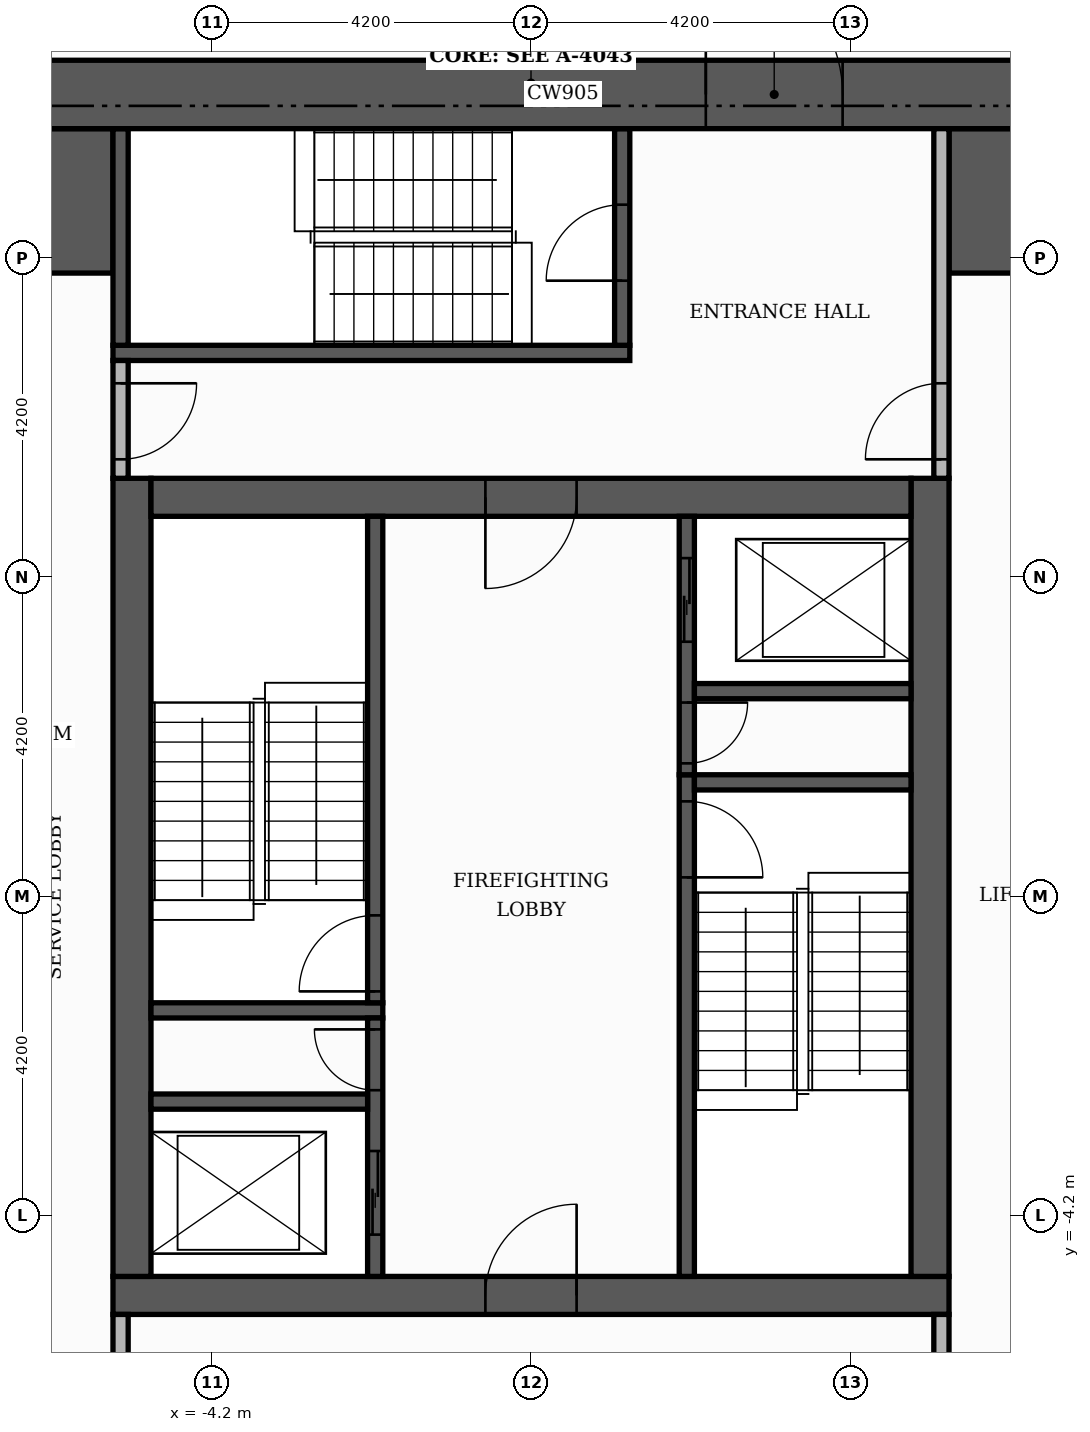
"""IFC4 building model, lengths in metres.
Left out: names, types, materials, properties, quantities, classifications, styles, units other than length and angle.
Written with IfcOpenShell. Run it as: python <this file> out.ifc"""

import sys

from ifc_helpers import new_model, si_unit, direction, frame, frame_2d, origin, place, context, subcontext, project, spatial, rectangle, extrude, element, fill, save


model = new_model("IFC4")
c1 = context("Model", 3, precision=1e-05, world=origin(), true_north=direction((0.0, 1.0)))
c2 = subcontext(c1, "Body", "Model", "MODEL_VIEW")
j1 = project(units=[si_unit("LENGTHUNIT", "METRE"), si_unit("PLANEANGLEUNIT", "RADIAN")], contexts=[c1])
p1 = place(None, origin())
s1 = spatial("IfcSite", under=j1, at=p1, CompositionType="ELEMENT")
p2 = place(p1, origin())
s2 = spatial("IfcBuilding", under=s1, at=p2, CompositionType="ELEMENT")
p3 = place(p2, frame((0.0, 0.0, 267.9)))
s3 = spatial("IfcBuildingStorey", under=s2, at=p3, CompositionType="ELEMENT", Elevation=267.9)
p4 = place(p3, frame((-5.5, -5.25, 0.0), z_axis=(0.0, 0.0, 1.0), x_axis=(1.0, 0.0, 0.0)))
e1 = element("IfcWall", 1, at=p4, inside=s3, PredefinedType="SHEAR", context=c2, shape_type="SweptSolid", body=[
    extrude(rectangle(XDim=11.0, YDim=0.5, at=frame_2d((5.5, 0.0))), origin(), (0.0, 0.0, 1.0), 3.48),
])
p5 = place(p4, frame((4.9, 0.0, 0.0)))
e2 = element("IfcOpeningElement", 2, at=p5, cuts=e1, PredefinedType="OPENING", context=c2, shape_type="SweptSolid", body=[
    extrude(rectangle(XDim=1.2, YDim=2.1, at=frame_2d((0.6, 1.05))), frame((0.0, 0.26, 0.0), z_axis=(0.0, -1.0, 0.0), x_axis=(1.0, 0.0, 0.0)), (0.0, 0.0, 1.0), 0.52),
])
for number, where, z_axis, x_axis in (
    (3, (-5.25, -5.0, 0.0), (0.0, 0.0, 1.0), (0.0, 1.0, 0.0)),
    (4, (5.25, -5.0, 0.0), (0.0, 0.0, 1.0), (0.0, 1.0, 0.0)),
):
    element("IfcWall", number, at=place(p3, frame(where, z_axis=z_axis, x_axis=x_axis)), inside=s3, PredefinedType="SHEAR", context=c2, shape_type="SweptSolid", body=[
        extrude(rectangle(XDim=10.5, YDim=0.5, at=frame_2d((5.25, 0.0))), origin(), (0.0, 0.0, 1.0), 3.48),
    ])
p6 = place(p3, frame((-5.0, 5.25, 0.0), z_axis=(0.0, 0.0, 1.0), x_axis=(1.0, 0.0, 0.0)))
e5 = element("IfcWall", 5, at=p6, inside=s3, PredefinedType="SHEAR", context=c2, shape_type="SweptSolid", body=[
    extrude(rectangle(XDim=10.0, YDim=0.5, at=frame_2d((5.0, 0.0))), origin(), (0.0, 0.0, 1.0), 3.48),
])
p7 = place(p6, frame((4.4, 0.0, 0.0)))
e6 = element("IfcOpeningElement", 6, at=p7, cuts=e5, PredefinedType="OPENING", context=c2, shape_type="SweptSolid", body=[
    extrude(rectangle(XDim=1.2, YDim=2.1, at=frame_2d((0.6, 1.05))), frame((0.0, 0.26, 0.0), z_axis=(0.0, -1.0, 0.0), x_axis=(1.0, 0.0, 0.0)), (0.0, 0.0, 1.0), 0.52),
])
for number, where, z_axis, x_axis in (
    (7, (-10.1, 9.15, 0.0), (0.0, 0.0, 1.0), (1.0, 0.0, 0.0)),
    (8, (5.5, 9.15, 0.0), (0.0, 0.0, 1.0), (1.0, 0.0, 0.0)),
):
    element("IfcWall", number, at=place(p3, frame(where, z_axis=z_axis, x_axis=x_axis)), inside=s3, PredefinedType="SHEAR", context=c2, shape_type="SweptSolid", body=[
        extrude(rectangle(XDim=4.6, YDim=1.9, at=frame_2d((2.3, 0.0))), origin(), (0.0, 0.0, 1.0), 3.48),
    ])
p8 = place(p3, frame((2.05, -5.0, 0.0), z_axis=(0.0, 0.0, 1.0), x_axis=(0.0, 1.0, 0.0)))
e9 = element("IfcWall", 9, at=p8, inside=s3, PredefinedType="SHEAR", context=c2, shape_type="SweptSolid", body=[
    extrude(rectangle(XDim=6.6, YDim=0.2, at=frame_2d((3.3, 0.0))), origin(), (0.0, 0.0, 1.0), 3.48),
])
p9 = place(p8, frame((5.25, 0.0, 0.0)))
e10 = element("IfcOpeningElement", 10, at=p9, cuts=e9, PredefinedType="OPENING", context=c2, shape_type="SweptSolid", body=[
    extrude(rectangle(XDim=1.0, YDim=2.1, at=frame_2d((0.5, 1.05))), frame((0.0, 0.11, 0.0), z_axis=(0.0, -1.0, 0.0), x_axis=(1.0, 0.0, 0.0)), (0.0, 0.0, 1.0), 0.22),
])
p10 = place(p3, frame((-5.0, -1.5, 0.0), z_axis=(0.0, 0.0, 1.0), x_axis=(1.0, 0.0, 0.0)))
e11 = element("IfcWall", 11, at=p10, inside=s3, PredefinedType="SHEAR", context=c2, shape_type="SweptSolid", body=[
    extrude(rectangle(XDim=3.05, YDim=0.2, at=frame_2d((1.525, 0.0))), origin(), (0.0, 0.0, 1.0), 3.48),
])
p11 = place(p3, frame((-2.05, -1.4, 0.0), z_axis=(0.0, 0.0, 1.0), x_axis=(0.0, 1.0, 0.0)))
e12 = element("IfcWall", 12, at=p11, inside=s3, PredefinedType="SHEAR", context=c2, shape_type="SweptSolid", body=[
    extrude(rectangle(XDim=6.4, YDim=0.2, at=frame_2d((3.2, 0.0))), origin(), (0.0, 0.0, 1.0), 3.48),
])
p12 = place(p11, frame((0.15, 0.0, 0.0)))
e13 = element("IfcOpeningElement", 13, at=p12, cuts=e12, PredefinedType="OPENING", context=c2, shape_type="SweptSolid", body=[
    extrude(rectangle(XDim=1.0, YDim=2.1, at=frame_2d((0.5, 1.05))), frame((0.0, 0.11, 0.0), z_axis=(0.0, -1.0, 0.0), x_axis=(1.0, 0.0, 0.0)), (0.0, 0.0, 1.0), 0.22),
])
p13 = place(p3, frame((2.15, 1.5, 0.0), z_axis=(0.0, 0.0, 1.0), x_axis=(1.0, 0.0, 0.0)))
e14 = element("IfcWall", 14, at=p13, inside=s3, PredefinedType="SHEAR", context=c2, shape_type="SweptSolid", body=[
    extrude(rectangle(XDim=2.85, YDim=0.2, at=frame_2d((1.425, 0.0))), origin(), (0.0, 0.0, 1.0), 3.48),
])
p14 = place(p3, frame((-5.5, 7.15, 0.0), z_axis=(0.0, 0.0, 1.0), x_axis=(1.0, 0.0, 0.0)))
e15 = element("IfcWall", 15, at=p14, inside=s3, PredefinedType="SHEAR", context=c2, shape_type="SweptSolid", body=[
    extrude(rectangle(XDim=6.8, YDim=0.2, at=frame_2d((3.4, 0.0))), origin(), (0.0, 0.0, 1.0), 3.48),
])
p15 = place(p3, frame((-5.4, 7.25, 0.0), z_axis=(0.0, 0.0, 1.0), x_axis=(0.0, 1.0, 0.0)))
e16 = element("IfcWall", 16, at=p15, inside=s3, PredefinedType="SHEAR", context=c2, shape_type="SweptSolid", body=[
    extrude(rectangle(XDim=2.85, YDim=0.2, at=frame_2d((1.425, 0.0))), origin(), (0.0, 0.0, 1.0), 3.48),
])
p16 = place(p3, frame((1.2, 7.25, 0.0), z_axis=(0.0, 0.0, 1.0), x_axis=(0.0, 1.0, 0.0)))
e17 = element("IfcWall", 17, at=p16, inside=s3, PredefinedType="SHEAR", context=c2, shape_type="SweptSolid", body=[
    extrude(rectangle(XDim=2.85, YDim=0.2, at=frame_2d((1.425, 0.0))), origin(), (0.0, 0.0, 1.0), 3.48),
])
p17 = place(p16, frame((0.85, 0.0, 0.0)))
e18 = element("IfcOpeningElement", 18, at=p17, cuts=e17, PredefinedType="OPENING", context=c2, shape_type="SweptSolid", body=[
    extrude(rectangle(XDim=1.0, YDim=2.1, at=frame_2d((0.5, 1.05))), frame((0.0, 0.11, 0.0), z_axis=(0.0, -1.0, 0.0), x_axis=(1.0, 0.0, 0.0)), (0.0, 0.0, 1.0), 0.22),
])
p18 = place(p3, frame((-2.05, -5.0, 0.0), z_axis=(0.0, 0.0, 1.0), x_axis=(0.0, 1.0, 0.0)))
e19 = element("IfcWall", 19, at=p18, inside=s3, PredefinedType="SHEAR", context=c2, shape_type="SweptSolid", body=[
    extrude(rectangle(XDim=3.4, YDim=0.2, at=frame_2d((1.7, 0.0))), origin(), (0.0, 0.0, 1.0), 3.48),
])
p19 = place(p18, frame((0.55, 0.0, 0.0)))
e20 = element("IfcOpeningElement", 20, at=p19, cuts=e19, PredefinedType="OPENING", context=c2, shape_type="SweptSolid", body=[
    extrude(rectangle(XDim=1.1, YDim=2.1, at=frame_2d((0.55, 1.05))), frame((0.0, 0.11, 0.0), z_axis=(0.0, -1.0, 0.0), x_axis=(1.0, 0.0, 0.0)), (0.0, 0.0, 1.0), 0.22),
])
p20 = place(p18, frame((2.45, 0.0, 0.0)))
e21 = element("IfcOpeningElement", 21, at=p20, cuts=e19, PredefinedType="OPENING", context=c2, shape_type="SweptSolid", body=[
    extrude(rectangle(XDim=0.8, YDim=2.1, at=frame_2d((0.4, 1.05))), frame((0.0, 0.11, 0.0), z_axis=(0.0, -1.0, 0.0), x_axis=(1.0, 0.0, 0.0)), (0.0, 0.0, 1.0), 0.22),
])
p21 = place(p3, frame((-5.0, -2.7, 0.0), z_axis=(0.0, 0.0, 1.0), x_axis=(1.0, 0.0, 0.0)))
e22 = element("IfcWall", 22, at=p21, inside=s3, PredefinedType="SHEAR", context=c2, shape_type="SweptSolid", body=[
    extrude(rectangle(XDim=2.85, YDim=0.2, at=frame_2d((1.425, 0.0))), origin(), (0.0, 0.0, 1.0), 3.48),
])
p22 = place(p3, frame((2.05, 1.6, 0.0), z_axis=(0.0, 0.0, 1.0), x_axis=(0.0, 1.0, 0.0)))
e23 = element("IfcWall", 23, at=p22, inside=s3, PredefinedType="SHEAR", context=c2, shape_type="SweptSolid", body=[
    extrude(rectangle(XDim=3.4, YDim=0.2, at=frame_2d((1.7, 0.0))), origin(), (0.0, 0.0, 1.0), 3.48),
])
p23 = place(p22, frame((1.75, 0.0, 0.0)))
e24 = element("IfcOpeningElement", 24, at=p23, cuts=e23, PredefinedType="OPENING", context=c2, shape_type="SweptSolid", body=[
    extrude(rectangle(XDim=1.1, YDim=2.1, at=frame_2d((0.55, 1.05))), frame((0.0, 0.11, 0.0), z_axis=(0.0, -1.0, 0.0), x_axis=(1.0, 0.0, 0.0)), (0.0, 0.0, 1.0), 0.22),
])
p24 = place(p22, frame((0.15, 0.0, 0.0)))
e25 = element("IfcOpeningElement", 25, at=p24, cuts=e23, PredefinedType="OPENING", context=c2, shape_type="SweptSolid", body=[
    extrude(rectangle(XDim=0.8, YDim=2.1, at=frame_2d((0.4, 1.05))), frame((0.0, 0.11, 0.0), z_axis=(0.0, -1.0, 0.0), x_axis=(1.0, 0.0, 0.0)), (0.0, 0.0, 1.0), 0.22),
])
p25 = place(p3, frame((2.15, 2.7, 0.0), z_axis=(0.0, 0.0, 1.0), x_axis=(1.0, 0.0, 0.0)))
e26 = element("IfcWall", 26, at=p25, inside=s3, PredefinedType="SHEAR", context=c2, shape_type="SweptSolid", body=[
    extrude(rectangle(XDim=2.85, YDim=0.2, at=frame_2d((1.425, 0.0))), origin(), (0.0, 0.0, 1.0), 3.48),
])
p26 = place(p3, frame((-11.0, 10.55, 0.0), z_axis=(0.0, 0.0, 1.0), x_axis=(1.0, 0.0, 0.0)))
e27 = element("IfcWall", 27, at=p26, inside=s3, PredefinedType="SHEAR", context=c2, shape_type="SweptSolid", body=[
    extrude(rectangle(XDim=22.0, YDim=0.9, at=frame_2d((11.0, 0.0))), origin(), (0.0, 0.0, 1.0), 3.48),
])
p27 = place(p26, frame((13.3, 0.0, 0.0)))
e28 = element("IfcOpeningElement", 28, at=p27, cuts=e27, PredefinedType="OPENING", context=c2, shape_type="SweptSolid", body=[
    extrude(rectangle(XDim=1.8, YDim=2.2, at=frame_2d((0.9, 1.1))), frame((0.0, 0.46, 0.0), z_axis=(0.0, -1.0, 0.0), x_axis=(1.0, 0.0, 0.0)), (0.0, 0.0, 1.0), 0.92),
])
p28 = place(p3, frame((-5.4, -10.1, 0.0), z_axis=(0.0, 0.0, 1.0), x_axis=(0.0, 1.0, 0.0)))
e29 = element("IfcWall", 29, at=p28, inside=s3, PredefinedType="PARTITIONING", context=c2, shape_type="SweptSolid", body=[
    extrude(rectangle(XDim=4.6, YDim=0.2, at=frame_2d((2.3, 0.0))), origin(), (0.0, 0.0, 1.0), 3.48),
])
p29 = place(p28, frame((2.9, 0.0, 0.0)))
e30 = element("IfcOpeningElement", 30, at=p29, cuts=e29, PredefinedType="OPENING", context=c2, shape_type="SweptSolid", body=[
    extrude(rectangle(XDim=1.0, YDim=2.1, at=frame_2d((0.5, 1.05))), frame((0.0, 0.11, 0.0), z_axis=(0.0, -1.0, 0.0), x_axis=(1.0, 0.0, 0.0)), (0.0, 0.0, 1.0), 0.22),
])
p30 = place(p3, frame((5.4, -10.1, 0.0), z_axis=(0.0, 0.0, 1.0), x_axis=(0.0, 1.0, 0.0)))
e31 = element("IfcWall", 31, at=p30, inside=s3, PredefinedType="PARTITIONING", context=c2, shape_type="SweptSolid", body=[
    extrude(rectangle(XDim=4.6, YDim=0.2, at=frame_2d((2.3, 0.0))), origin(), (0.0, 0.0, 1.0), 3.48),
])
p31 = place(p30, frame((2.9, 0.0, 0.0)))
e32 = element("IfcOpeningElement", 32, at=p31, cuts=e31, PredefinedType="OPENING", context=c2, shape_type="SweptSolid", body=[
    extrude(rectangle(XDim=1.0, YDim=2.1, at=frame_2d((0.5, 1.05))), frame((0.0, 0.11, 0.0), z_axis=(0.0, -1.0, 0.0), x_axis=(1.0, 0.0, 0.0)), (0.0, 0.0, 1.0), 0.22),
])
p32 = place(p3, frame((-5.4, 5.5, 0.0), z_axis=(0.0, 0.0, 1.0), x_axis=(0.0, 1.0, 0.0)))
e33 = element("IfcWall", 33, at=p32, inside=s3, PredefinedType="PARTITIONING", context=c2, shape_type="SweptSolid", body=[
    extrude(rectangle(XDim=1.55, YDim=0.2, at=frame_2d((0.775, 0.0))), origin(), (0.0, 0.0, 1.0), 3.48),
])
p33 = place(p32, frame((0.25, 0.0, 0.0)))
e34 = element("IfcOpeningElement", 34, at=p33, cuts=e33, PredefinedType="OPENING", context=c2, shape_type="SweptSolid", body=[
    extrude(rectangle(XDim=1.0, YDim=2.1, at=frame_2d((0.5, 1.05))), frame((0.0, 0.11, 0.0), z_axis=(0.0, -1.0, 0.0), x_axis=(1.0, 0.0, 0.0)), (0.0, 0.0, 1.0), 0.22),
])
p34 = place(p3, frame((5.4, 5.5, 0.0), z_axis=(0.0, 0.0, 1.0), x_axis=(0.0, 1.0, 0.0)))
e35 = element("IfcWall", 35, at=p34, inside=s3, PredefinedType="PARTITIONING", context=c2, shape_type="SweptSolid", body=[
    extrude(rectangle(XDim=4.6, YDim=0.2, at=frame_2d((2.3, 0.0))), origin(), (0.0, 0.0, 1.0), 3.48),
])
p35 = place(p34, frame((0.25, 0.0, 0.0)))
e36 = element("IfcOpeningElement", 36, at=p35, cuts=e35, PredefinedType="OPENING", context=c2, shape_type="SweptSolid", body=[
    extrude(rectangle(XDim=1.0, YDim=2.1, at=frame_2d((0.5, 1.05))), frame((0.0, 0.11, 0.0), z_axis=(0.0, -1.0, 0.0), x_axis=(1.0, 0.0, 0.0)), (0.0, 0.0, 1.0), 0.22),
])
p36 = place(p23, origin())
e37 = element("IfcDoor", 37, at=p36, inside=s3, OperationType="SLIDING_TO_LEFT", PredefinedType="DOOR", context=c2, shape_type="SweptSolid", body=[
    extrude(rectangle(XDim=1.1, YDim=2.1, at=frame_2d((0.55, 1.05))), frame((0.0, 0.025, 0.0), z_axis=(0.0, -1.0, 0.0), x_axis=(1.0, 0.0, 0.0)), (0.0, 0.0, 1.0), 0.05),
])
fill(e24, e37)
p37 = place(p19, origin())
e38 = element("IfcDoor", 38, at=p37, inside=s3, OperationType="SLIDING_TO_LEFT", PredefinedType="DOOR", context=c2, shape_type="SweptSolid", body=[
    extrude(rectangle(XDim=1.1, YDim=2.1, at=frame_2d((0.55, 1.05))), frame((0.0, 0.025, 0.0), z_axis=(0.0, -1.0, 0.0), x_axis=(1.0, 0.0, 0.0)), (0.0, 0.0, 1.0), 0.05),
])
fill(e20, e38)
p38 = place(p12, origin())
e39 = element("IfcDoor", 39, at=p38, inside=s3, OperationType="SINGLE_SWING_LEFT", PredefinedType="DOOR", context=c2, shape_type="SweptSolid", body=[
    extrude(rectangle(XDim=1.0, YDim=2.1, at=frame_2d((0.5, 1.05))), frame((0.0, 0.025, 0.0), z_axis=(0.0, -1.0, 0.0), x_axis=(1.0, 0.0, 0.0)), (0.0, 0.0, 1.0), 0.05),
])
fill(e13, e39)
p39 = place(p9, frame((1.0, 0.0, 0.0), z_axis=(0.0, 0.0, 1.0), x_axis=(-1.0, 0.0, 0.0)))
e40 = element("IfcDoor", 40, at=p39, inside=s3, OperationType="SINGLE_SWING_LEFT", PredefinedType="DOOR", context=c2, shape_type="SweptSolid", body=[
    extrude(rectangle(XDim=1.0, YDim=2.1, at=frame_2d((0.5, 1.05))), frame((0.0, 0.025, 0.0), z_axis=(0.0, -1.0, 0.0), x_axis=(1.0, 0.0, 0.0)), (0.0, 0.0, 1.0), 0.05),
])
fill(e10, e40)
p40 = place(p24, frame((0.8, 0.0, 0.0), z_axis=(0.0, 0.0, 1.0), x_axis=(-1.0, 0.0, 0.0)))
e41 = element("IfcDoor", 41, at=p40, inside=s3, OperationType="SINGLE_SWING_RIGHT", PredefinedType="DOOR", context=c2, shape_type="SweptSolid", body=[
    extrude(rectangle(XDim=0.8, YDim=2.1, at=frame_2d((0.4, 1.05))), frame((0.0, 0.025, 0.0), z_axis=(0.0, -1.0, 0.0), x_axis=(1.0, 0.0, 0.0)), (0.0, 0.0, 1.0), 0.05),
])
fill(e25, e41)
p41 = place(p20, origin())
e42 = element("IfcDoor", 42, at=p41, inside=s3, OperationType="SINGLE_SWING_RIGHT", PredefinedType="DOOR", context=c2, shape_type="SweptSolid", body=[
    extrude(rectangle(XDim=0.8, YDim=2.1, at=frame_2d((0.4, 1.05))), frame((0.0, 0.025, 0.0), z_axis=(0.0, -1.0, 0.0), x_axis=(1.0, 0.0, 0.0)), (0.0, 0.0, 1.0), 0.05),
])
fill(e21, e42)
p42 = place(p7, frame((1.2, 0.0, 0.0), z_axis=(0.0, 0.0, 1.0), x_axis=(-1.0, 0.0, 0.0)))
e43 = element("IfcDoor", 43, at=p42, inside=s3, OperationType="SINGLE_SWING_LEFT", PredefinedType="DOOR", context=c2, shape_type="SweptSolid", body=[
    extrude(rectangle(XDim=1.2, YDim=2.1, at=frame_2d((0.6, 1.05))), frame((0.0, 0.025, 0.0), z_axis=(0.0, -1.0, 0.0), x_axis=(1.0, 0.0, 0.0)), (0.0, 0.0, 1.0), 0.05),
])
fill(e6, e43)
p43 = place(p5, origin())
e44 = element("IfcDoor", 44, at=p43, inside=s3, OperationType="SINGLE_SWING_RIGHT", PredefinedType="DOOR", context=c2, shape_type="SweptSolid", body=[
    extrude(rectangle(XDim=1.2, YDim=2.1, at=frame_2d((0.6, 1.05))), frame((0.0, 0.025, 0.0), z_axis=(0.0, -1.0, 0.0), x_axis=(1.0, 0.0, 0.0)), (0.0, 0.0, 1.0), 0.05),
])
fill(e2, e44)
p44 = place(p17, origin())
e45 = element("IfcDoor", 45, at=p44, inside=s3, OperationType="SINGLE_SWING_LEFT", PredefinedType="DOOR", context=c2, shape_type="SweptSolid", body=[
    extrude(rectangle(XDim=1.0, YDim=2.1, at=frame_2d((0.5, 1.05))), frame((0.0, 0.025, 0.0), z_axis=(0.0, -1.0, 0.0), x_axis=(1.0, 0.0, 0.0)), (0.0, 0.0, 1.0), 0.05),
])
fill(e18, e45)
p45 = place(p33, frame((1.0, 0.0, 0.0), z_axis=(0.0, 0.0, 1.0), x_axis=(-1.0, 0.0, 0.0)))
e46 = element("IfcDoor", 46, at=p45, inside=s3, OperationType="SINGLE_SWING_RIGHT", PredefinedType="DOOR", context=c2, shape_type="SweptSolid", body=[
    extrude(rectangle(XDim=1.0, YDim=2.1, at=frame_2d((0.5, 1.05))), frame((0.0, 0.025, 0.0), z_axis=(0.0, -1.0, 0.0), x_axis=(1.0, 0.0, 0.0)), (0.0, 0.0, 1.0), 0.05),
])
fill(e34, e46)
p46 = place(p35, origin())
e47 = element("IfcDoor", 47, at=p46, inside=s3, OperationType="SINGLE_SWING_LEFT", PredefinedType="DOOR", context=c2, shape_type="SweptSolid", body=[
    extrude(rectangle(XDim=1.0, YDim=2.1, at=frame_2d((0.5, 1.05))), frame((0.0, 0.025, 0.0), z_axis=(0.0, -1.0, 0.0), x_axis=(1.0, 0.0, 0.0)), (0.0, 0.0, 1.0), 0.05),
])
fill(e36, e47)
p47 = place(p27, origin())
e48 = element("IfcDoor", 48, at=p47, inside=s3, OperationType="DOUBLE_DOOR_SINGLE_SWING", PredefinedType="DOOR", context=c2, shape_type="SweptSolid", body=[
    extrude(rectangle(XDim=1.8, YDim=2.2, at=frame_2d((0.9, 1.1))), frame((0.0, 0.025, 0.0), z_axis=(0.0, -1.0, 0.0), x_axis=(1.0, 0.0, 0.0)), (0.0, 0.0, 1.0), 0.05),
])
fill(e28, e48)
save(model, sys.argv[1])
